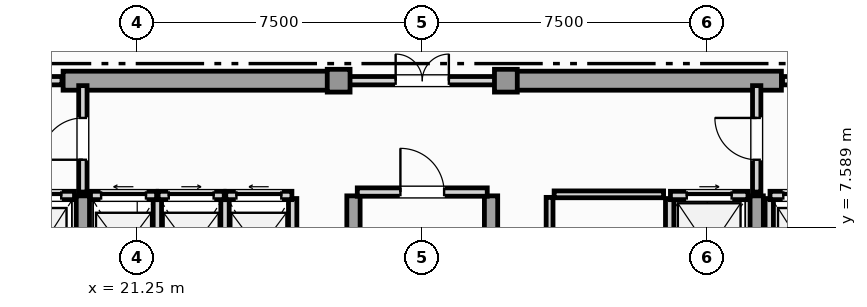
"""IFC4 building model, lengths in metres.
Left out: names, types, materials, properties, quantities, classifications, styles, units other than length and angle.
Written with IfcOpenShell. Run it as: python <this file> out.ifc"""

import sys

from ifc_helpers import new_model, si_unit, direction, frame, frame_2d, origin, origin_2d, place, context, subcontext, project, spatial, rectangle, extrude, element, fill, save


model = new_model("IFC4")
c1 = context("Model", 3, precision=1e-05, world=origin(), true_north=direction((0.0, 1.0)))
c2 = subcontext(c1, "Body", "Model", "MODEL_VIEW")
j1 = project(units=[si_unit("LENGTHUNIT", "METRE"), si_unit("PLANEANGLEUNIT", "RADIAN")], contexts=[c1])
p1 = place(None, origin())
s1 = spatial("IfcSite", under=j1, at=p1, CompositionType="ELEMENT")
p2 = place(p1, origin())
s2 = spatial("IfcBuilding", under=s1, at=p2, CompositionType="ELEMENT")
p3 = place(p2, frame((0.0, 0.0, 362.25)))
s3 = spatial("IfcBuildingStorey", under=s2, at=p3, CompositionType="ELEMENT", Elevation=362.25)
for number, where, z_axis, x_axis in (
    (1, (19.3, 11.45, 0.0), (0.0, 0.0, 1.0), (1.0, 0.0, 0.0)),
    (2, (30.9, 11.45, 0.0), (0.0, 0.0, 1.0), (1.0, 0.0, 0.0)),
):
    element("IfcWall", number, at=place(p3, frame(where, z_axis=z_axis, x_axis=x_axis)), inside=s3, PredefinedType="SHEAR", context=c2, shape_type="SweptSolid", body=[
        extrude(rectangle(XDim=7.3, YDim=0.5, at=frame_2d((3.65, 0.0))), origin(), (0.0, 0.0, 1.0), 4.1),
    ])
for number, where, z_axis, x_axis in (
    (3, (19.82, 0.92, 0.0), (0.0, 0.0, 1.0), (0.0, 1.0, 0.0)),
    (4, (26.94, 0.92, 0.0), (0.0, 0.0, 1.0), (0.0, 1.0, 0.0)),
    (5, (30.56, 0.92, 0.0), (0.0, 0.0, 1.0), (0.0, 1.0, 0.0)),
    (6, (37.55, 0.92, 0.0), (0.0, 0.0, 1.0), (0.0, 1.0, 0.0)),
):
    element("IfcWall", number, at=place(p3, frame(where, z_axis=z_axis, x_axis=x_axis)), inside=s3, PredefinedType="SHEAR", context=c2, shape_type="SweptSolid", body=[
        extrude(rectangle(XDim=7.5, YDim=0.35, at=frame_2d((3.75, 0.0))), origin(), (0.0, 0.0, 1.0), 4.1),
    ])
for number, where, z_axis, x_axis in (
    (7, (26.55, 11.45, 0.0), (0.0, 0.0, 1.0), (1.0, 0.0, 0.0)),
    (8, (30.95, 11.45, 0.0), (0.0, 0.0, 1.0), (1.0, 0.0, 0.0)),
):
    element("IfcColumn", number, at=place(p3, frame(where, z_axis=z_axis, x_axis=x_axis)), inside=s3, PredefinedType="COLUMN", context=c2, shape_type="SweptSolid", body=[
        extrude(rectangle(XDim=0.6, YDim=0.6, at=origin_2d()), origin(), (0.0, 0.0, 1.0), 4.4),
    ])
p4 = place(p3, frame((17.78, 8.43, 0.0), z_axis=(0.0, 0.0, 1.0), x_axis=(1.0, 0.0, 0.0)))
e9 = element("IfcWall", 9, at=p4, inside=s3, PredefinedType="SOLIDWALL", context=c2, shape_type="SweptSolid", body=[
    extrude(rectangle(XDim=1.82, YDim=0.22, at=frame_2d((0.91, 0.0))), origin(), (0.0, 0.0, 1.0), 4.1),
])
p5 = place(p4, frame((0.35, 0.0, 0.0)))
e10 = element("IfcOpeningElement", 10, at=p5, cuts=e9, PredefinedType="OPENING", context=c2, shape_type="SweptSolid", body=[
    extrude(rectangle(XDim=1.12, YDim=2.25, at=frame_2d((0.56, 1.125))), frame((0.0, 0.12, 0.0), z_axis=(0.0, -1.0, 0.0), x_axis=(1.0, 0.0, 0.0)), (0.0, 0.0, 1.0), 0.24),
])
p6 = place(p3, frame((37.88, 5.65, 0.0), z_axis=(0.0, 0.0, 1.0), x_axis=(0.0, 1.0, 0.0)))
e11 = element("IfcWall", 11, at=p6, inside=s3, PredefinedType="SOLIDWALL", context=c2, shape_type="SweptSolid", body=[
    extrude(rectangle(XDim=2.7, YDim=0.22, at=frame_2d((1.35, 0.0))), origin(), (0.0, 0.0, 1.0), 4.1),
])
p7 = place(p3, frame((37.9, 8.43, 0.0), z_axis=(0.0, 0.0, 1.0), x_axis=(1.0, 0.0, 0.0)))
e12 = element("IfcWall", 12, at=p7, inside=s3, PredefinedType="SOLIDWALL", context=c2, shape_type="SweptSolid", body=[
    extrude(rectangle(XDim=1.82, YDim=0.22, at=frame_2d((0.91, 0.0))), origin(), (0.0, 0.0, 1.0), 4.1),
])
p8 = place(p7, frame((0.35, 0.0, 0.0)))
e13 = element("IfcOpeningElement", 13, at=p8, cuts=e12, PredefinedType="OPENING", context=c2, shape_type="SweptSolid", body=[
    extrude(rectangle(XDim=1.12, YDim=2.25, at=frame_2d((0.56, 1.125))), frame((0.0, 0.12, 0.0), z_axis=(0.0, -1.0, 0.0), x_axis=(1.0, 0.0, 0.0)), (0.0, 0.0, 1.0), 0.24),
])
p9 = place(p3, frame((35.26, 5.65, 0.0), z_axis=(0.0, 0.0, 1.0), x_axis=(0.0, 1.0, 0.0)))
e14 = element("IfcWall", 14, at=p9, inside=s3, PredefinedType="SOLIDWALL", context=c2, shape_type="SweptSolid", body=[
    extrude(rectangle(XDim=2.7, YDim=0.22, at=frame_2d((1.35, 0.0))), origin(), (0.0, 0.0, 1.0), 4.1),
])
p10 = place(p3, frame((35.28, 8.43, 0.0), z_axis=(0.0, 0.0, 1.0), x_axis=(1.0, 0.0, 0.0)))
e15 = element("IfcWall", 15, at=p10, inside=s3, PredefinedType="SOLIDWALL", context=c2, shape_type="SweptSolid", body=[
    extrude(rectangle(XDim=2.04, YDim=0.22, at=frame_2d((1.02, 0.0))), origin(), (0.0, 0.0, 1.0), 4.1),
])
p11 = place(p10, frame((0.43, 0.0, 0.0)))
e16 = element("IfcOpeningElement", 16, at=p11, cuts=e15, PredefinedType="OPENING", context=c2, shape_type="SweptSolid", body=[
    extrude(rectangle(XDim=1.18, YDim=2.2, at=frame_2d((0.59, 1.1))), frame((0.0, 0.12, 0.0), z_axis=(0.0, -1.0, 0.0), x_axis=(1.0, 0.0, 0.0)), (0.0, 0.0, 1.0), 0.24),
])
p12 = place(p3, frame((21.78, 5.65, 0.0), z_axis=(0.0, 0.0, 1.0), x_axis=(0.0, 1.0, 0.0)))
e17 = element("IfcWall", 17, at=p12, inside=s3, PredefinedType="SOLIDWALL", context=c2, shape_type="SweptSolid", body=[
    extrude(rectangle(XDim=2.7, YDim=0.22, at=frame_2d((1.35, 0.0))), origin(), (0.0, 0.0, 1.0), 4.1),
])
p13 = place(p3, frame((20.02, 8.43, 0.0), z_axis=(0.0, 0.0, 1.0), x_axis=(1.0, 0.0, 0.0)))
e18 = element("IfcWall", 18, at=p13, inside=s3, PredefinedType="SOLIDWALL", context=c2, shape_type="SweptSolid", body=[
    extrude(rectangle(XDim=1.74, YDim=0.22, at=frame_2d((0.87, 0.0))), origin(), (0.0, 0.0, 1.0), 4.1),
])
p14 = place(p13, frame((0.28, 0.0, 0.0)))
e19 = element("IfcOpeningElement", 19, at=p14, cuts=e18, PredefinedType="OPENING", context=c2, shape_type="SweptSolid", body=[
    extrude(rectangle(XDim=1.18, YDim=2.2, at=frame_2d((0.59, 1.1))), frame((0.0, 0.12, 0.0), z_axis=(0.0, -1.0, 0.0), x_axis=(1.0, 0.0, 0.0)), (0.0, 0.0, 1.0), 0.24),
])
p15 = place(p3, frame((23.56, 5.65, 0.0), z_axis=(0.0, 0.0, 1.0), x_axis=(0.0, 1.0, 0.0)))
e20 = element("IfcWall", 20, at=p15, inside=s3, PredefinedType="SOLIDWALL", context=c2, shape_type="SweptSolid", body=[
    extrude(rectangle(XDim=2.7, YDim=0.22, at=frame_2d((1.35, 0.0))), origin(), (0.0, 0.0, 1.0), 4.1),
])
p16 = place(p3, frame((21.8, 8.43, 0.0), z_axis=(0.0, 0.0, 1.0), x_axis=(1.0, 0.0, 0.0)))
e21 = element("IfcWall", 21, at=p16, inside=s3, PredefinedType="SOLIDWALL", context=c2, shape_type="SweptSolid", body=[
    extrude(rectangle(XDim=1.74, YDim=0.22, at=frame_2d((0.87, 0.0))), origin(), (0.0, 0.0, 1.0), 4.1),
])
p17 = place(p16, frame((0.28, 0.0, 0.0)))
e22 = element("IfcOpeningElement", 22, at=p17, cuts=e21, PredefinedType="OPENING", context=c2, shape_type="SweptSolid", body=[
    extrude(rectangle(XDim=1.18, YDim=2.2, at=frame_2d((0.59, 1.1))), frame((0.0, 0.12, 0.0), z_axis=(0.0, -1.0, 0.0), x_axis=(1.0, 0.0, 0.0)), (0.0, 0.0, 1.0), 0.24),
])
p18 = place(p3, frame((25.34, 5.65, 0.0), z_axis=(0.0, 0.0, 1.0), x_axis=(0.0, 1.0, 0.0)))
e23 = element("IfcWall", 23, at=p18, inside=s3, PredefinedType="SOLIDWALL", context=c2, shape_type="SweptSolid", body=[
    extrude(rectangle(XDim=2.7, YDim=0.22, at=frame_2d((1.35, 0.0))), origin(), (0.0, 0.0, 1.0), 4.1),
])
p19 = place(p3, frame((23.58, 8.43, 0.0), z_axis=(0.0, 0.0, 1.0), x_axis=(1.0, 0.0, 0.0)))
e24 = element("IfcWall", 24, at=p19, inside=s3, PredefinedType="SOLIDWALL", context=c2, shape_type="SweptSolid", body=[
    extrude(rectangle(XDim=1.74, YDim=0.22, at=frame_2d((0.87, 0.0))), origin(), (0.0, 0.0, 1.0), 4.1),
])
p20 = place(p19, frame((0.28, 0.0, 0.0)))
e25 = element("IfcOpeningElement", 25, at=p20, cuts=e24, PredefinedType="OPENING", context=c2, shape_type="SweptSolid", body=[
    extrude(rectangle(XDim=1.18, YDim=2.2, at=frame_2d((0.59, 1.1))), frame((0.0, 0.12, 0.0), z_axis=(0.0, -1.0, 0.0), x_axis=(1.0, 0.0, 0.0)), (0.0, 0.0, 1.0), 0.24),
])
p21 = place(p3, frame((27.04, 8.52, 0.0), z_axis=(0.0, 0.0, 1.0), x_axis=(1.0, 0.0, 0.0)))
e26 = element("IfcWall", 26, at=p21, inside=s3, PredefinedType="SOLIDWALL", context=c2, shape_type="SweptSolid", body=[
    extrude(rectangle(XDim=3.42, YDim=0.22, at=frame_2d((1.71, 0.0))), origin(), (0.0, 0.0, 1.0), 4.1),
])
p22 = place(p21, frame((1.135, 0.0, 0.0)))
e27 = element("IfcOpeningElement", 27, at=p22, cuts=e26, PredefinedType="OPENING", context=c2, shape_type="SweptSolid", body=[
    extrude(rectangle(XDim=1.15, YDim=2.2, at=frame_2d((0.575, 1.1))), frame((0.0, 0.12, 0.0), z_axis=(0.0, -1.0, 0.0), x_axis=(1.0, 0.0, 0.0)), (0.0, 0.0, 1.0), 0.24),
])
p23 = place(p3, frame((19.82, 8.52, 0.0), z_axis=(0.0, 0.0, 1.0), x_axis=(0.0, 1.0, 0.0)))
e28 = element("IfcWall", 28, at=p23, inside=s3, PredefinedType="SOLIDWALL", context=c2, shape_type="SweptSolid", body=[
    extrude(rectangle(XDim=2.8, YDim=0.22, at=frame_2d((1.4, 0.0))), origin(), (0.0, 0.0, 1.0), 3.555),
])
p24 = place(p23, frame((0.85, 0.0, 0.0)))
e29 = element("IfcOpeningElement", 29, at=p24, cuts=e28, PredefinedType="OPENING", context=c2, shape_type="SweptSolid", body=[
    extrude(rectangle(XDim=1.1, YDim=2.2, at=frame_2d((0.55, 1.1))), frame((0.0, 0.12, 0.0), z_axis=(0.0, -1.0, 0.0), x_axis=(1.0, 0.0, 0.0)), (0.0, 0.0, 1.0), 0.24),
])
p25 = place(p3, frame((37.55, 8.52, 0.0), z_axis=(0.0, 0.0, 1.0), x_axis=(0.0, 1.0, 0.0)))
e30 = element("IfcWall", 30, at=p25, inside=s3, PredefinedType="SOLIDWALL", context=c2, shape_type="SweptSolid", body=[
    extrude(rectangle(XDim=2.8, YDim=0.22, at=frame_2d((1.4, 0.0))), origin(), (0.0, 0.0, 1.0), 3.555),
])
p26 = place(p25, frame((0.85, 0.0, 0.0)))
e31 = element("IfcOpeningElement", 31, at=p26, cuts=e30, PredefinedType="OPENING", context=c2, shape_type="SweptSolid", body=[
    extrude(rectangle(XDim=1.1, YDim=2.2, at=frame_2d((0.55, 1.1))), frame((0.0, 0.12, 0.0), z_axis=(0.0, -1.0, 0.0), x_axis=(1.0, 0.0, 0.0)), (0.0, 0.0, 1.0), 0.24),
])
p27 = place(p3, frame((16.23, 11.45, 0.0), z_axis=(0.0, 0.0, 1.0), x_axis=(1.0, 0.0, 0.0)))
e32 = element("IfcWall", 32, at=p27, inside=s3, PredefinedType="SOLIDWALL", context=c2, shape_type="SweptSolid", body=[
    extrude(rectangle(XDim=3.04, YDim=0.22, at=frame_2d((1.52, 0.0))), origin(), (0.0, 0.0, 1.0), 4.1),
])
p28 = place(p27, frame((0.97, 0.0, 0.0)))
e33 = element("IfcOpeningElement", 33, at=p28, cuts=e32, PredefinedType="OPENING", context=c2, shape_type="SweptSolid", body=[
    extrude(rectangle(XDim=1.1, YDim=2.2, at=frame_2d((0.55, 1.1))), frame((0.0, 0.12, 0.0), z_axis=(0.0, -1.0, 0.0), x_axis=(1.0, 0.0, 0.0)), (0.0, 0.0, 1.0), 0.24),
])
p29 = place(p3, frame((26.63, 11.45, 0.0), z_axis=(0.0, 0.0, 1.0), x_axis=(1.0, 0.0, 0.0)))
e34 = element("IfcWall", 34, at=p29, inside=s3, PredefinedType="SOLIDWALL", context=c2, shape_type="SweptSolid", body=[
    extrude(rectangle(XDim=4.24, YDim=0.22, at=frame_2d((2.12, 0.0))), origin(), (0.0, 0.0, 1.0), 4.1),
])
p30 = place(p29, frame((1.42, 0.0, 0.0)))
e35 = element("IfcOpeningElement", 35, at=p30, cuts=e34, PredefinedType="OPENING", context=c2, shape_type="SweptSolid", body=[
    extrude(rectangle(XDim=1.4, YDim=2.2, at=frame_2d((0.7, 1.1))), frame((0.0, 0.12, 0.0), z_axis=(0.0, -1.0, 0.0), x_axis=(1.0, 0.0, 0.0)), (0.0, 0.0, 1.0), 0.24),
])
p31 = place(p3, frame((38.23, 11.45, 0.0), z_axis=(0.0, 0.0, 1.0), x_axis=(1.0, 0.0, 0.0)))
e36 = element("IfcWall", 36, at=p31, inside=s3, PredefinedType="SOLIDWALL", context=c2, shape_type="SweptSolid", body=[
    extrude(rectangle(XDim=3.04, YDim=0.22, at=frame_2d((1.52, 0.0))), origin(), (0.0, 0.0, 1.0), 4.1),
])
p32 = place(p31, frame((0.97, 0.0, 0.0)))
e37 = element("IfcOpeningElement", 37, at=p32, cuts=e36, PredefinedType="OPENING", context=c2, shape_type="SweptSolid", body=[
    extrude(rectangle(XDim=1.1, YDim=2.2, at=frame_2d((0.55, 1.1))), frame((0.0, 0.12, 0.0), z_axis=(0.0, -1.0, 0.0), x_axis=(1.0, 0.0, 0.0)), (0.0, 0.0, 1.0), 0.24),
])
p33 = place(p3, frame((32.1, 5.65, 0.0), z_axis=(0.0, 0.0, 1.0), x_axis=(0.0, 1.0, 0.0)))
e38 = element("IfcWall", 38, at=p33, inside=s3, PredefinedType="PARTITIONING", context=c2, shape_type="SweptSolid", body=[
    extrude(rectangle(XDim=2.73, YDim=0.18, at=frame_2d((1.365, 0.0))), origin(), (0.0, 0.0, 1.0), 4.1),
])
p34 = place(p33, frame((0.84, 0.0, 0.0)))
e39 = element("IfcOpeningElement", 39, at=p34, cuts=e38, PredefinedType="OPENING", context=c2, shape_type="SweptSolid", body=[
    extrude(rectangle(XDim=1.05, YDim=2.15, at=frame_2d((0.525, 1.075))), frame((0.0, 0.1, 0.0), z_axis=(0.0, -1.0, 0.0), x_axis=(1.0, 0.0, 0.0)), (0.0, 0.0, 1.0), 0.2),
])
p35 = place(p3, frame((32.22, 8.46, 0.0), z_axis=(0.0, 0.0, 1.0), x_axis=(1.0, 0.0, 0.0)))
e40 = element("IfcWall", 40, at=p35, inside=s3, PredefinedType="PARTITIONING", context=c2, shape_type="SweptSolid", body=[
    extrude(rectangle(XDim=2.88, YDim=0.18, at=frame_2d((1.44, 0.0))), origin(), (0.0, 0.0, 1.0), 4.1),
])
p36 = place(p5, origin())
e41 = element("IfcDoor", 41, at=p36, inside=s3, OperationType="SLIDING_TO_RIGHT", PredefinedType="DOOR", context=c2, shape_type="SweptSolid", body=[
    extrude(rectangle(XDim=1.12, YDim=2.25, at=frame_2d((0.56, 1.125))), frame((0.0, 0.025, 0.0), z_axis=(0.0, -1.0, 0.0), x_axis=(1.0, 0.0, 0.0)), (0.0, 0.0, 1.0), 0.05),
])
fill(e10, e41)
p37 = place(p8, origin())
e42 = element("IfcDoor", 42, at=p37, inside=s3, OperationType="SLIDING_TO_LEFT", PredefinedType="DOOR", context=c2, shape_type="SweptSolid", body=[
    extrude(rectangle(XDim=1.12, YDim=2.25, at=frame_2d((0.56, 1.125))), frame((0.0, 0.025, 0.0), z_axis=(0.0, -1.0, 0.0), x_axis=(1.0, 0.0, 0.0)), (0.0, 0.0, 1.0), 0.05),
])
fill(e13, e42)
p38 = place(p11, origin())
e43 = element("IfcDoor", 43, at=p38, inside=s3, OperationType="SLIDING_TO_RIGHT", PredefinedType="DOOR", context=c2, shape_type="SweptSolid", body=[
    extrude(rectangle(XDim=1.18, YDim=2.2, at=frame_2d((0.59, 1.1))), frame((0.0, 0.025, 0.0), z_axis=(0.0, -1.0, 0.0), x_axis=(1.0, 0.0, 0.0)), (0.0, 0.0, 1.0), 0.05),
])
fill(e16, e43)
p39 = place(p14, origin())
e44 = element("IfcDoor", 44, at=p39, inside=s3, OperationType="SLIDING_TO_LEFT", PredefinedType="DOOR", context=c2, shape_type="SweptSolid", body=[
    extrude(rectangle(XDim=1.18, YDim=2.2, at=frame_2d((0.59, 1.1))), frame((0.0, 0.025, 0.0), z_axis=(0.0, -1.0, 0.0), x_axis=(1.0, 0.0, 0.0)), (0.0, 0.0, 1.0), 0.05),
])
fill(e19, e44)
p40 = place(p17, origin())
e45 = element("IfcDoor", 45, at=p40, inside=s3, OperationType="SLIDING_TO_RIGHT", PredefinedType="DOOR", context=c2, shape_type="SweptSolid", body=[
    extrude(rectangle(XDim=1.18, YDim=2.2, at=frame_2d((0.59, 1.1))), frame((0.0, 0.025, 0.0), z_axis=(0.0, -1.0, 0.0), x_axis=(1.0, 0.0, 0.0)), (0.0, 0.0, 1.0), 0.05),
])
fill(e22, e45)
p41 = place(p20, origin())
e46 = element("IfcDoor", 46, at=p41, inside=s3, OperationType="SLIDING_TO_LEFT", PredefinedType="DOOR", context=c2, shape_type="SweptSolid", body=[
    extrude(rectangle(XDim=1.18, YDim=2.2, at=frame_2d((0.59, 1.1))), frame((0.0, 0.025, 0.0), z_axis=(0.0, -1.0, 0.0), x_axis=(1.0, 0.0, 0.0)), (0.0, 0.0, 1.0), 0.05),
])
fill(e25, e46)
p42 = place(p22, origin())
e47 = element("IfcDoor", 47, at=p42, inside=s3, OperationType="SINGLE_SWING_LEFT", PredefinedType="DOOR", context=c2, shape_type="SweptSolid", body=[
    extrude(rectangle(XDim=1.15, YDim=2.2, at=frame_2d((0.575, 1.1))), frame((0.0, 0.025, 0.0), z_axis=(0.0, -1.0, 0.0), x_axis=(1.0, 0.0, 0.0)), (0.0, 0.0, 1.0), 0.05),
])
fill(e27, e47)
p43 = place(p24, origin())
e48 = element("IfcDoor", 48, at=p43, inside=s3, OperationType="SINGLE_SWING_LEFT", PredefinedType="DOOR", context=c2, shape_type="SweptSolid", body=[
    extrude(rectangle(XDim=1.1, YDim=2.2, at=frame_2d((0.55, 1.1))), frame((0.0, 0.025, 0.0), z_axis=(0.0, -1.0, 0.0), x_axis=(1.0, 0.0, 0.0)), (0.0, 0.0, 1.0), 0.05),
])
fill(e29, e48)
p44 = place(p26, origin())
e49 = element("IfcDoor", 49, at=p44, inside=s3, OperationType="SINGLE_SWING_RIGHT", PredefinedType="DOOR", context=c2, shape_type="SweptSolid", body=[
    extrude(rectangle(XDim=1.1, YDim=2.2, at=frame_2d((0.55, 1.1))), frame((0.0, 0.025, 0.0), z_axis=(0.0, -1.0, 0.0), x_axis=(1.0, 0.0, 0.0)), (0.0, 0.0, 1.0), 0.05),
])
fill(e31, e49)
p45 = place(p30, origin())
e50 = element("IfcDoor", 50, at=p45, inside=s3, OperationType="DOUBLE_DOOR_SINGLE_SWING", PredefinedType="DOOR", context=c2, shape_type="SweptSolid", body=[
    extrude(rectangle(XDim=1.4, YDim=2.2, at=frame_2d((0.7, 1.1))), frame((0.0, 0.025, 0.0), z_axis=(0.0, -1.0, 0.0), x_axis=(1.0, 0.0, 0.0)), (0.0, 0.0, 1.0), 0.05),
])
fill(e35, e50)
save(model, sys.argv[1])
